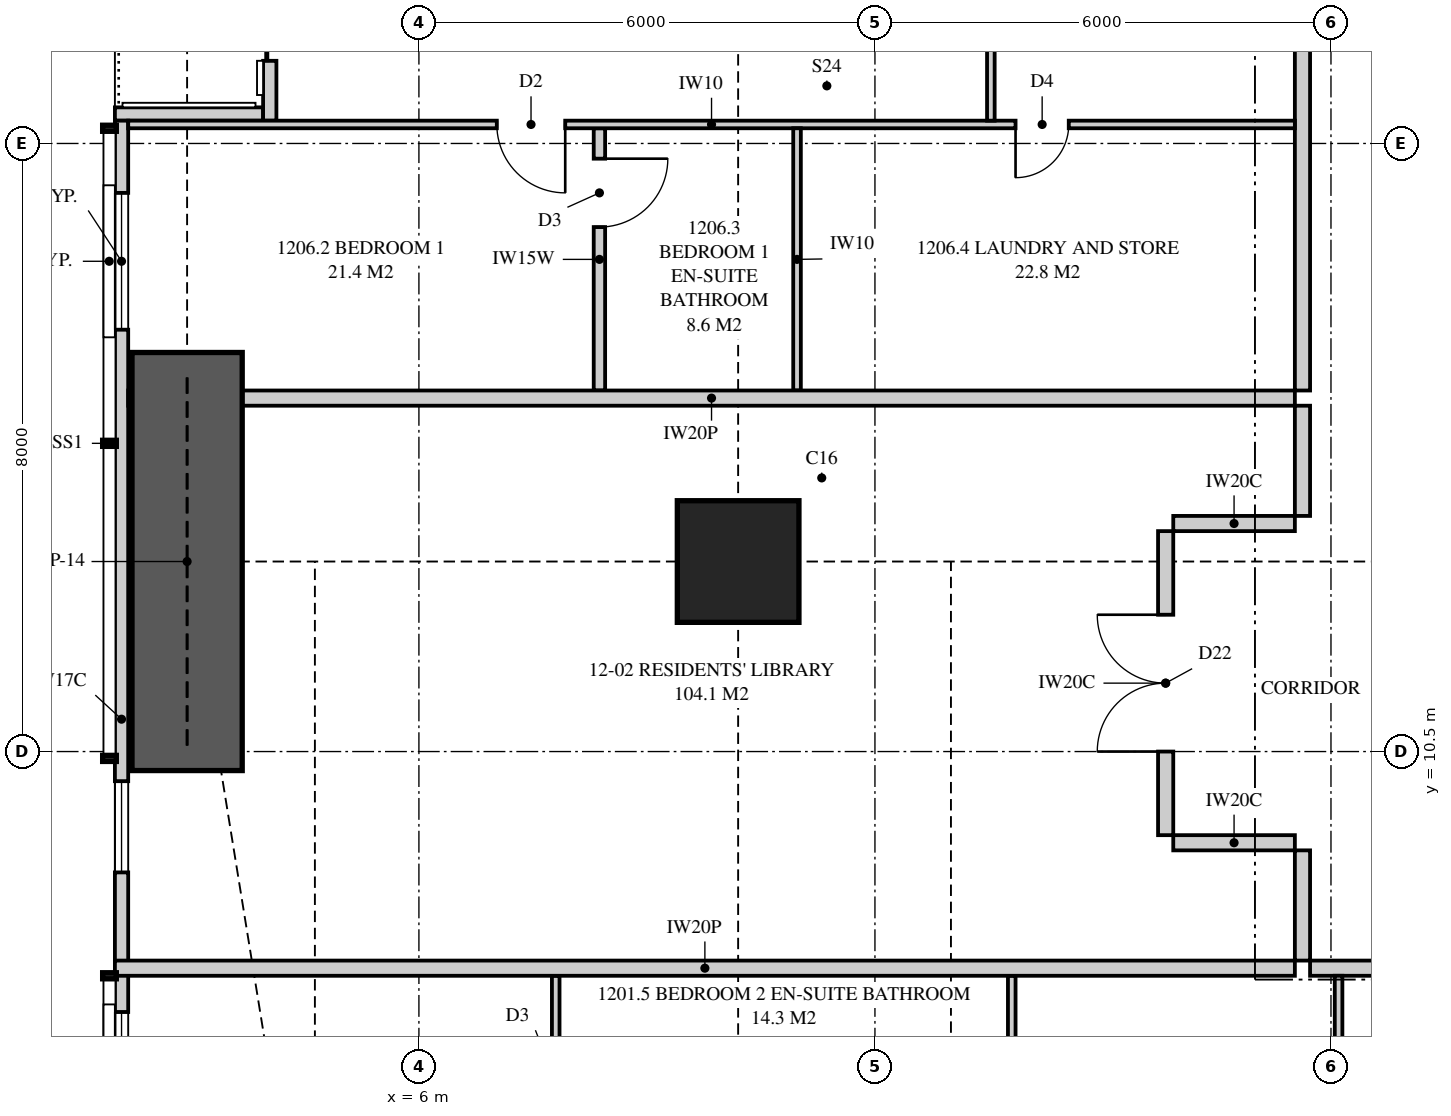
"""IFC4 building model, lengths in metres.
Left out: names, types, materials, properties, quantities, classifications, styles, units other than length and angle.
Written with IfcOpenShell. Run it as: python <this file> out.ifc"""

import sys

from ifc_helpers import new_model, si_unit, direction, frame, frame_2d, origin, origin_2d, place, context, subcontext, project, spatial, polyline, rectangle, outline, extrude, element, fill, save


model = new_model("IFC4")
c1 = context("Model", 3, precision=1e-05, world=origin(), true_north=direction((0.0, 1.0)))
c2 = subcontext(c1, "Body", "Model", "MODEL_VIEW")
j1 = project(units=[si_unit("LENGTHUNIT", "METRE"), si_unit("PLANEANGLEUNIT", "RADIAN")], contexts=[c1])
p1 = place(None, origin())
s1 = spatial("IfcSite", under=j1, at=p1, CompositionType="ELEMENT")
p2 = place(p1, origin())
s2 = spatial("IfcBuilding", under=s1, at=p2, CompositionType="ELEMENT")
p3 = place(p2, frame((0.0, 0.0, 47.8)))
s3 = spatial("IfcBuildingStorey", under=s2, at=p3, CompositionType="ELEMENT", Elevation=47.8)
p4 = place(p3, frame((10.2, 13.0, 0.0), z_axis=(0.0, 0.0, 1.0), x_axis=(1.0, 0.0, 0.0)))
e1 = element("IfcColumn", 1, at=p4, inside=s3, PredefinedType="COLUMN", context=c2, shape_type="SweptSolid", body=[
    extrude(rectangle(XDim=1.6, YDim=1.6, at=origin_2d()), origin(), (0.0, 0.0, 1.0), 3.35),
])
p5 = place(p3, frame((2.087, 18.8, 0.0), z_axis=(0.0, 0.0, 1.0), x_axis=(0.0, -1.0, 0.0)))
e2 = element("IfcWall", 2, at=p5, inside=s3, PredefinedType="SOLIDWALL", context=c2, shape_type="SweptSolid", body=[
    extrude(outline(polyline([(0.0, 0.0), (15.749, 0.0), (15.749, 3.11), (6.019, 3.11), (6.019, 2.15), (5.926, 2.15), (5.926, 3.11), (5.8, 3.11), (5.8, 2.15), (0.0, 2.15), (0.0, 0.0)])), frame((0.0, 0.087, 0.0), z_axis=(0.0, -1.0, 0.0), x_axis=(1.0, 0.0, 0.0)), (0.0, 0.0, 1.0), 0.175),
])
p6 = place(p5, frame((0.95, 0.0, 0.4)))
e3 = element("IfcOpeningElement", 3, at=p6, cuts=e2, PredefinedType="OPENING", context=c2, shape_type="SweptSolid", body=[
    extrude(rectangle(XDim=1.8, YDim=1.7, at=frame_2d((0.9, 0.85))), frame((0.0, 0.097, 0.0), z_axis=(0.0, -1.0, 0.0), x_axis=(1.0, 0.0, 0.0)), (0.0, 0.0, 1.0), 0.195),
])
p7 = place(p5, frame((8.69, 0.0, 0.4)))
e4 = element("IfcOpeningElement", 4, at=p7, cuts=e2, PredefinedType="OPENING", context=c2, shape_type="SweptSolid", body=[
    extrude(rectangle(XDim=1.2, YDim=1.7, at=frame_2d((0.6, 0.85))), frame((0.0, 0.097, 0.0), z_axis=(0.0, -1.0, 0.0), x_axis=(1.0, 0.0, 0.0)), (0.0, 0.0, 1.0), 0.195),
])
p8 = place(p5, frame((11.727, 0.0, 0.4)))
e5 = element("IfcOpeningElement", 5, at=p8, cuts=e2, PredefinedType="OPENING", context=c2, shape_type="SweptSolid", body=[
    extrude(rectangle(XDim=1.8, YDim=1.7, at=frame_2d((0.9, 0.85))), frame((0.0, 0.097, 0.0), z_axis=(0.0, -1.0, 0.0), x_axis=(1.0, 0.0, 0.0)), (0.0, 0.0, 1.0), 0.195),
])
p9 = place(p3, frame((4.038, 22.175, 0.0), z_axis=(0.0, 0.0, 1.0), x_axis=(0.0, -1.0, 0.0)))
e6 = element("IfcWall", 6, at=p9, inside=s3, PredefinedType="SOLIDWALL", context=c2, shape_type="SweptSolid", body=[
    extrude(rectangle(XDim=3.375, YDim=0.175, at=frame_2d((1.688, 0.0))), origin(), (0.0, 0.0, 1.0), 3.11),
])
p10 = place(p9, frame((0.788, 0.0, 0.0)))
e7 = element("IfcOpeningElement", 7, at=p10, cuts=e6, PredefinedType="OPENING", context=c2, shape_type="SweptSolid", body=[
    extrude(rectangle(XDim=1.8, YDim=2.1, at=frame_2d((0.9, 1.05))), frame((0.0, 0.097, 0.0), z_axis=(0.0, -1.0, 0.0), x_axis=(1.0, 0.0, 0.0)), (0.0, 0.0, 1.0), 0.195),
])
p11 = place(p3, frame((2.0, 18.887, 0.0), z_axis=(0.0, 0.0, 1.0), x_axis=(1.0, 0.0, 0.0)))
e8 = element("IfcWall", 8, at=p11, inside=s3, PredefinedType="SOLIDWALL", context=c2, shape_type="SweptSolid", body=[
    extrude(outline(polyline([(0.0, 0.0), (1.95, 0.0), (1.95, 3.11), (1.75, 3.11), (1.75, 2.15), (0.15, 2.15), (0.15, 3.11), (0.0, 3.11), (0.0, 0.0)])), frame((0.0, 0.087, 0.0), z_axis=(0.0, -1.0, 0.0), x_axis=(1.0, 0.0, 0.0)), (0.0, 0.0, 1.0), 0.175),
])
p12 = place(p3, frame((17.725, 7.65, 0.0), z_axis=(0.0, 0.0, 1.0), x_axis=(1.0, 0.0, 0.0)))
e9 = element("IfcWall", 9, at=p12, inside=s3, PredefinedType="PARTITIONING", context=c2, shape_type="SweptSolid", body=[
    extrude(outline(polyline([(0.0, 0.0), (18.625, 0.0), (18.625, 3.11), (17.612, 3.11), (17.612, 2.541), (16.938, 2.541), (16.938, 3.11), (6.612, 3.11), (6.612, 2.541), (5.938, 2.541), (5.938, 3.11), (0.0, 3.11), (0.0, 0.0)])), frame((0.0, 0.1, 0.0), z_axis=(0.0, -1.0, 0.0), x_axis=(1.0, 0.0, 0.0)), (0.0, 0.0, 1.0), 0.2),
])
p13 = place(p12, frame((1.0, 0.0, 0.0)))
e10 = element("IfcOpeningElement", 10, at=p13, cuts=e9, PredefinedType="OPENING", context=c2, shape_type="SweptSolid", body=[
    extrude(rectangle(XDim=1.05, YDim=2.2, at=frame_2d((0.525, 1.1))), frame((0.0, 0.11, 0.0), z_axis=(0.0, -1.0, 0.0), x_axis=(1.0, 0.0, 0.0)), (0.0, 0.0, 1.0), 0.22),
])
p14 = place(p3, frame((7.8, 0.175, 0.0), z_axis=(0.0, 0.0, 1.0), x_axis=(0.0, 1.0, 0.0)))
e11 = element("IfcWall", 11, at=p14, inside=s3, PredefinedType="PARTITIONING", context=c2, shape_type="SweptSolid", body=[
    extrude(outline(polyline([(0.0, 0.0), (7.375, 0.0), (7.375, 3.11), (2.697, 3.11), (2.697, 2.15), (0.943, 2.15), (0.943, 3.11), (0.0, 3.11), (0.0, 0.0)])), frame((0.0, 0.05, 0.0), z_axis=(0.0, -1.0, 0.0), x_axis=(1.0, 0.0, 0.0)), (0.0, 0.0, 1.0), 0.1),
])
p15 = place(p14, frame((2.772, 0.0, 0.0)))
e12 = element("IfcOpeningElement", 12, at=p15, cuts=e11, PredefinedType="OPENING", context=c2, shape_type="SweptSolid", body=[
    extrude(rectangle(XDim=0.9, YDim=2.1, at=frame_2d((0.45, 1.05))), frame((0.0, 0.06, 0.0), z_axis=(0.0, -1.0, 0.0), x_axis=(1.0, 0.0, 0.0)), (0.0, 0.0, 1.0), 0.12),
])
p16 = place(p14, frame((5.523, 0.0, 0.0)))
e13 = element("IfcOpeningElement", 13, at=p16, cuts=e11, PredefinedType="OPENING", context=c2, shape_type="SweptSolid", body=[
    extrude(rectangle(XDim=0.9, YDim=2.1, at=frame_2d((0.45, 1.05))), frame((0.0, 0.06, 0.0), z_axis=(0.0, -1.0, 0.0), x_axis=(1.0, 0.0, 0.0)), (0.0, 0.0, 1.0), 0.12),
])
p17 = place(p3, frame((13.8, 0.175, 0.0), z_axis=(0.0, 0.0, 1.0), x_axis=(0.0, 1.0, 0.0)))
e14 = element("IfcWall", 14, at=p17, inside=s3, PredefinedType="PARTITIONING", context=c2, shape_type="SweptSolid", body=[
    extrude(outline(polyline([(1.635, 2.15), (0.0, 2.15), (0.0, 0.0), (7.375, 0.0), (7.375, 3.11), (1.635, 3.11), (1.635, 2.15)]), holes=[polyline([(1.021, 0.126), (0.529, 0.126), (0.529, 0.919), (1.021, 0.919), (1.021, 0.126)]), polyline([(1.021, 1.231), (0.529, 1.231), (0.529, 2.024), (1.021, 2.024), (1.021, 1.231)])]), frame((0.0, 0.05, 0.0), z_axis=(0.0, -1.0, 0.0), x_axis=(1.0, 0.0, 0.0)), (0.0, 0.0, 1.0), 0.1),
])
p18 = place(p17, frame((3.525, 0.0, 0.0)))
e15 = element("IfcOpeningElement", 15, at=p18, cuts=e14, PredefinedType="OPENING", context=c2, shape_type="SweptSolid", body=[
    extrude(rectangle(XDim=0.9, YDim=2.1, at=frame_2d((0.45, 1.05))), frame((0.0, 0.06, 0.0), z_axis=(0.0, -1.0, 0.0), x_axis=(1.0, 0.0, 0.0)), (0.0, 0.0, 1.0), 0.12),
])
p19 = place(p3, frame((18.1, 0.175, 0.0), z_axis=(0.0, 0.0, 1.0), x_axis=(0.0, 1.0, 0.0)))
e16 = element("IfcWall", 16, at=p19, inside=s3, PredefinedType="PARTITIONING", context=c2, shape_type="SweptSolid", body=[
    extrude(outline(polyline([(0.0, 0.0), (7.375, 0.0), (7.375, 3.11), (1.635, 3.11), (1.635, 2.15), (0.0, 2.15), (0.0, 3.11), (0.0, 0.0)])), frame((0.0, 0.05, 0.0), z_axis=(0.0, -1.0, 0.0), x_axis=(1.0, 0.0, 0.0)), (0.0, 0.0, 1.0), 0.1),
])
p20 = place(p19, frame((3.525, 0.0, 0.0)))
e17 = element("IfcOpeningElement", 17, at=p20, cuts=e16, PredefinedType="OPENING", context=c2, shape_type="SweptSolid", body=[
    extrude(rectangle(XDim=0.9, YDim=2.1, at=frame_2d((0.45, 1.05))), frame((0.0, 0.06, 0.0), z_axis=(0.0, -1.0, 0.0), x_axis=(1.0, 0.0, 0.0)), (0.0, 0.0, 1.0), 0.12),
])
p21 = place(p19, frame((4.95, 0.0, 0.0)))
e18 = element("IfcOpeningElement", 18, at=p21, cuts=e16, PredefinedType="OPENING", context=c2, shape_type="SweptSolid", body=[
    extrude(rectangle(XDim=0.9, YDim=2.1, at=frame_2d((0.45, 1.05))), frame((0.0, 0.06, 0.0), z_axis=(0.0, -1.0, 0.0), x_axis=(1.0, 0.0, 0.0)), (0.0, 0.0, 1.0), 0.12),
])
p22 = place(p3, frame((2.0, 7.65, 0.0), z_axis=(0.0, 0.0, 1.0), x_axis=(1.0, 0.0, 0.0)))
e19 = element("IfcWall", 19, at=p22, inside=s3, PredefinedType="PARTITIONING", context=c2, shape_type="SweptSolid", body=[
    extrude(outline(polyline([(0.0, 0.0), (15.525, 0.0), (15.525, 3.11), (11.337, 3.11), (11.337, 2.541), (10.663, 2.541), (10.663, 3.11), (9.51, 3.11), (9.51, 2.51), (6.89, 2.51), (6.89, 3.11), (2.969, 3.11), (2.969, 2.541), (2.74, 2.541), (2.74, 2.15), (0.896, 2.15), (0.896, 3.11), (0.0, 3.11), (0.0, 0.0)])), frame((0.0, 0.1, 0.0), z_axis=(0.0, -1.0, 0.0), x_axis=(1.0, 0.0, 0.0)), (0.0, 0.0, 1.0), 0.2),
])
p23 = place(p3, frame((2.175, 15.15, 0.0), z_axis=(0.0, 0.0, 1.0), x_axis=(1.0, 0.0, 0.0)))
e20 = element("IfcWall", 20, at=p23, inside=s3, PredefinedType="PARTITIONING", context=c2, shape_type="SweptSolid", body=[
    extrude(outline(polyline([(0.529, 2.15), (0.0, 2.15), (0.0, 0.0), (0.529, 0.0), (0.529, 0.021), (1.021, 0.021), (1.021, 0.0), (15.35, 0.0), (15.35, 3.11), (9.335, 3.11), (9.335, 2.51), (6.715, 2.51), (6.715, 3.11), (1.685, 3.11), (1.685, 2.15), (1.021, 2.15), (1.021, 2.129), (0.529, 2.129), (0.529, 2.15)])), frame((0.0, 0.1, 0.0), z_axis=(0.0, -1.0, 0.0), x_axis=(1.0, 0.0, 0.0)), (0.0, 0.0, 1.0), 0.2),
])
p24 = place(p3, frame((17.625, 7.75, 0.0), z_axis=(0.0, 0.0, 1.0), x_axis=(0.0, 1.0, 0.0)))
e21 = element("IfcWall", 21, at=p24, inside=s3, PredefinedType="PARTITIONING", context=c2, shape_type="SweptSolid", body=[
    extrude(rectangle(XDim=1.45, YDim=0.2, at=frame_2d((0.725, 0.0))), origin(), (0.0, 0.0, 1.0), 3.11),
])
p25 = place(p3, frame((17.625, 15.25, 0.0), z_axis=(0.0, 0.0, 1.0), x_axis=(0.0, 1.0, 0.0)))
e22 = element("IfcWall", 22, at=p25, inside=s3, PredefinedType="PARTITIONING", context=c2, shape_type="SweptSolid", body=[
    extrude(outline(polyline([(0.0, 0.0), (14.0, 0.0), (14.0, 3.11), (10.087, 3.11), (10.087, 2.541), (9.413, 2.541), (9.413, 3.11), (0.0, 3.11), (0.0, 0.0)])), frame((0.0, 0.1, 0.0), z_axis=(0.0, -1.0, 0.0), x_axis=(1.0, 0.0, 0.0)), (0.0, 0.0, 1.0), 0.2),
])
p26 = place(p25, frame((6.5, 0.0, 0.0)))
e23 = element("IfcOpeningElement", 23, at=p26, cuts=e22, PredefinedType="OPENING", context=c2, shape_type="SweptSolid", body=[
    extrude(rectangle(XDim=1.05, YDim=2.2, at=frame_2d((0.525, 1.1))), frame((0.0, 0.11, 0.0), z_axis=(0.0, -1.0, 0.0), x_axis=(1.0, 0.0, 0.0)), (0.0, 0.0, 1.0), 0.22),
])
p27 = place(p3, frame((2.175, 18.75, 0.0), z_axis=(0.0, 0.0, 1.0), x_axis=(1.0, 0.0, 0.0)))
e24 = element("IfcWall", 24, at=p27, inside=s3, PredefinedType="PARTITIONING", context=c2, shape_type="SweptSolid", body=[
    extrude(outline(polyline([(0.0, 0.0), (15.35, 0.0), (15.35, 3.11), (9.285, 3.11), (9.285, 2.51), (6.765, 2.51), (6.765, 3.11), (1.635, 3.11), (1.635, 2.15), (0.0, 2.15), (0.0, 3.11), (0.0, 0.0)])), frame((0.0, 0.05, 0.0), z_axis=(0.0, -1.0, 0.0), x_axis=(1.0, 0.0, 0.0)), (0.0, 0.0, 1.0), 0.1),
])
p28 = place(p27, frame((4.85, 0.0, 0.0)))
e25 = element("IfcOpeningElement", 25, at=p28, cuts=e24, PredefinedType="OPENING", context=c2, shape_type="SweptSolid", body=[
    extrude(rectangle(XDim=0.9, YDim=2.1, at=frame_2d((0.45, 1.05))), frame((0.0, 0.06, 0.0), z_axis=(0.0, -1.0, 0.0), x_axis=(1.0, 0.0, 0.0)), (0.0, 0.0, 1.0), 0.12),
])
p29 = place(p27, frame((11.675, 0.0, 0.0)))
e26 = element("IfcOpeningElement", 26, at=p29, cuts=e24, PredefinedType="OPENING", context=c2, shape_type="SweptSolid", body=[
    extrude(rectangle(XDim=0.7, YDim=2.1, at=frame_2d((0.35, 1.05))), frame((0.0, 0.06, 0.0), z_axis=(0.0, -1.0, 0.0), x_axis=(1.0, 0.0, 0.0)), (0.0, 0.0, 1.0), 0.12),
])
p30 = place(p3, frame((8.375, 15.25, 0.0), z_axis=(0.0, 0.0, 1.0), x_axis=(0.0, 1.0, 0.0)))
e27 = element("IfcWall", 27, at=p30, inside=s3, PredefinedType="PLUMBINGWALL", context=c2, shape_type="SweptSolid", body=[
    extrude(rectangle(XDim=3.45, YDim=0.15, at=frame_2d((1.725, 0.0))), origin(), (0.0, 0.0, 1.0), 3.11),
])
p31 = place(p30, frame((2.15, 0.0, 0.0)))
e28 = element("IfcOpeningElement", 28, at=p31, cuts=e27, PredefinedType="OPENING", context=c2, shape_type="SweptSolid", body=[
    extrude(rectangle(XDim=0.9, YDim=2.1, at=frame_2d((0.45, 1.05))), frame((0.0, 0.085, 0.0), z_axis=(0.0, -1.0, 0.0), x_axis=(1.0, 0.0, 0.0)), (0.0, 0.0, 1.0), 0.17),
])
p32 = place(p3, frame((10.975, 15.25, 0.0), z_axis=(0.0, 0.0, 1.0), x_axis=(0.0, 1.0, 0.0)))
e29 = element("IfcWall", 29, at=p32, inside=s3, PredefinedType="PARTITIONING", context=c2, shape_type="SweptSolid", body=[
    extrude(outline(polyline([(0.0, 0.0), (3.45, 0.0), (3.45, 3.11), (3.45, 2.51), (0.0, 2.51), (0.0, 3.11), (0.0, 0.0)])), frame((0.0, 0.05, 0.0), z_axis=(0.0, -1.0, 0.0), x_axis=(1.0, 0.0, 0.0)), (0.0, 0.0, 1.0), 0.1),
])
p33 = place(p3, frame((13.525, 18.8, 0.0), z_axis=(0.0, 0.0, 1.0), x_axis=(0.0, 1.0, 0.0)))
e30 = element("IfcWall", 30, at=p33, inside=s3, PredefinedType="PARTITIONING", context=c2, shape_type="SweptSolid", body=[
    extrude(outline(polyline([(0.0, 0.0), (10.45, 0.0), (10.45, 3.11), (6.487, 3.11), (6.487, 2.541), (5.913, 2.541), (5.913, 3.11), (0.0, 3.11), (0.0, 0.0)])), frame((0.0, 0.05, 0.0), z_axis=(0.0, -1.0, 0.0), x_axis=(1.0, 0.0, 0.0)), (0.0, 0.0, 1.0), 0.1),
])
p34 = place(p33, frame((2.95, 0.0, 0.0)))
e31 = element("IfcOpeningElement", 31, at=p34, cuts=e30, PredefinedType="OPENING", context=c2, shape_type="SweptSolid", body=[
    extrude(rectangle(XDim=1.0, YDim=2.1, at=frame_2d((0.5, 1.05))), frame((0.0, 0.06, 0.0), z_axis=(0.0, -1.0, 0.0), x_axis=(1.0, 0.0, 0.0)), (0.0, 0.0, 1.0), 0.12),
])
p35 = place(p3, frame((17.625, 13.6, 0.0), z_axis=(0.0, 0.0, 1.0), x_axis=(0.0, 1.0, 0.0)))
e32 = element("IfcWall", 32, at=p35, inside=s3, PredefinedType="PARTITIONING", context=c2, shape_type="SweptSolid", body=[
    extrude(rectangle(XDim=1.45, YDim=0.2, at=frame_2d((0.725, 0.0))), origin(), (0.0, 0.0, 1.0), 3.11),
])
p36 = place(p3, frame((15.825, 9.4, 0.0), z_axis=(0.0, 0.0, 1.0), x_axis=(0.0, 1.0, 0.0)))
e33 = element("IfcWall", 33, at=p36, inside=s3, PredefinedType="PARTITIONING", context=c2, shape_type="SweptSolid", body=[
    extrude(outline(polyline([(0.0, 0.0), (4.0, 0.0), (4.0, 3.11), (3.937, 3.11), (3.937, 2.541), (3.263, 2.541), (3.263, 3.11), (0.0, 3.11), (0.0, 0.0)])), frame((0.0, 0.1, 0.0), z_axis=(0.0, -1.0, 0.0), x_axis=(1.0, 0.0, 0.0)), (0.0, 0.0, 1.0), 0.2),
])
p37 = place(p36, frame((1.1, 0.0, 0.0)))
e34 = element("IfcOpeningElement", 34, at=p37, cuts=e33, PredefinedType="OPENING", context=c2, shape_type="SweptSolid", body=[
    extrude(rectangle(XDim=1.8, YDim=2.1, at=frame_2d((0.9, 1.05))), frame((0.0, 0.11, 0.0), z_axis=(0.0, -1.0, 0.0), x_axis=(1.0, 0.0, 0.0)), (0.0, 0.0, 1.0), 0.22),
])
for number, where, z_axis, x_axis in (
    (35, (17.525, 9.3, 0.0), (0.0, 0.0, 1.0), (-1.0, 0.0, 0.0)),
    (36, (17.525, 13.5, 0.0), (0.0, 0.0, 1.0), (-1.0, 0.0, 0.0)),
):
    element("IfcWall", number, at=place(p3, frame(where, z_axis=z_axis, x_axis=x_axis)), inside=s3, PredefinedType="PARTITIONING", context=c2, shape_type="SweptSolid", body=[
        extrude(rectangle(XDim=1.6, YDim=0.2, at=frame_2d((0.8, 0.0))), origin(), (0.0, 0.0, 1.0), 3.11),
    ])
p38 = place(p3, frame((2.95, 10.25, 0.0), z_axis=(0.0, 0.0, 1.0), x_axis=(0.0, 1.0, 0.0)))
e37 = element("IfcWall", 37, at=p38, inside=s3, PredefinedType="SHEAR", context=c2, shape_type="SweptSolid", body=[
    extrude(rectangle(XDim=5.5, YDim=1.45, at=frame_2d((2.75, 0.0))), origin(), (0.0, 0.0, 1.0), 3.35),
])
p39 = place(p10, origin())
e38 = element("IfcDoor", 38, at=p39, inside=s3, OperationType="SLIDING_TO_LEFT", PredefinedType="DOOR", context=c2, shape_type="SweptSolid", body=[
    extrude(rectangle(XDim=1.8, YDim=2.1, at=frame_2d((0.9, 1.05))), frame((0.0, 0.025, 0.0), z_axis=(0.0, -1.0, 0.0), x_axis=(1.0, 0.0, 0.0)), (0.0, 0.0, 1.0), 0.05),
])
fill(e7, e38)
p40 = place(p6, origin())
e39 = element("IfcWindow", 39, at=p40, inside=s3, PartitioningType="SINGLE_PANEL", PredefinedType="WINDOW", context=c2, shape_type="SweptSolid", body=[
    extrude(rectangle(XDim=1.8, YDim=1.7, at=frame_2d((0.9, 0.85))), frame((0.0, 0.03, 0.0), z_axis=(0.0, -1.0, 0.0), x_axis=(1.0, 0.0, 0.0)), (0.0, 0.0, 1.0), 0.06),
])
fill(e3, e39)
p41 = place(p7, origin())
e40 = element("IfcWindow", 40, at=p41, inside=s3, PartitioningType="SINGLE_PANEL", PredefinedType="WINDOW", context=c2, shape_type="SweptSolid", body=[
    extrude(rectangle(XDim=1.2, YDim=1.7, at=frame_2d((0.6, 0.85))), frame((0.0, 0.03, 0.0), z_axis=(0.0, -1.0, 0.0), x_axis=(1.0, 0.0, 0.0)), (0.0, 0.0, 1.0), 0.06),
])
fill(e4, e40)
p42 = place(p8, origin())
e41 = element("IfcWindow", 41, at=p42, inside=s3, PartitioningType="SINGLE_PANEL", PredefinedType="WINDOW", context=c2, shape_type="SweptSolid", body=[
    extrude(rectangle(XDim=1.8, YDim=1.7, at=frame_2d((0.9, 0.85))), frame((0.0, 0.03, 0.0), z_axis=(0.0, -1.0, 0.0), x_axis=(1.0, 0.0, 0.0)), (0.0, 0.0, 1.0), 0.06),
])
fill(e5, e41)
p43 = place(p37, origin())
e42 = element("IfcDoor", 42, at=p43, inside=s3, OperationType="DOUBLE_DOOR_SINGLE_SWING", PredefinedType="DOOR", context=c2, shape_type="SweptSolid", body=[
    extrude(rectangle(XDim=1.8, YDim=2.1, at=frame_2d((0.9, 1.05))), frame((0.0, 0.025, 0.0), z_axis=(0.0, -1.0, 0.0), x_axis=(1.0, 0.0, 0.0)), (0.0, 0.0, 1.0), 0.05),
])
fill(e34, e42)
p44 = place(p28, frame((0.9, 0.0, 0.0), z_axis=(0.0, 0.0, 1.0), x_axis=(-1.0, 0.0, 0.0)))
e43 = element("IfcDoor", 43, at=p44, inside=s3, OperationType="SINGLE_SWING_LEFT", PredefinedType="DOOR", context=c2, shape_type="SweptSolid", body=[
    extrude(rectangle(XDim=0.9, YDim=2.1, at=frame_2d((0.45, 1.05))), frame((0.0, 0.025, 0.0), z_axis=(0.0, -1.0, 0.0), x_axis=(1.0, 0.0, 0.0)), (0.0, 0.0, 1.0), 0.05),
])
fill(e25, e43)
p45 = place(p31, frame((0.9, 0.0, 0.0), z_axis=(0.0, 0.0, 1.0), x_axis=(-1.0, 0.0, 0.0)))
e44 = element("IfcDoor", 44, at=p45, inside=s3, OperationType="SINGLE_SWING_LEFT", PredefinedType="DOOR", context=c2, shape_type="SweptSolid", body=[
    extrude(rectangle(XDim=0.9, YDim=2.1, at=frame_2d((0.45, 1.05))), frame((0.0, 0.025, 0.0), z_axis=(0.0, -1.0, 0.0), x_axis=(1.0, 0.0, 0.0)), (0.0, 0.0, 1.0), 0.05),
])
fill(e28, e44)
p46 = place(p29, frame((0.7, 0.0, 0.0), z_axis=(0.0, 0.0, 1.0), x_axis=(-1.0, 0.0, 0.0)))
e45 = element("IfcDoor", 45, at=p46, inside=s3, OperationType="SINGLE_SWING_RIGHT", PredefinedType="DOOR", context=c2, shape_type="SweptSolid", body=[
    extrude(rectangle(XDim=0.7, YDim=2.1, at=frame_2d((0.35, 1.05))), frame((0.0, 0.025, 0.0), z_axis=(0.0, -1.0, 0.0), x_axis=(1.0, 0.0, 0.0)), (0.0, 0.0, 1.0), 0.05),
])
fill(e26, e45)
save(model, sys.argv[1])
